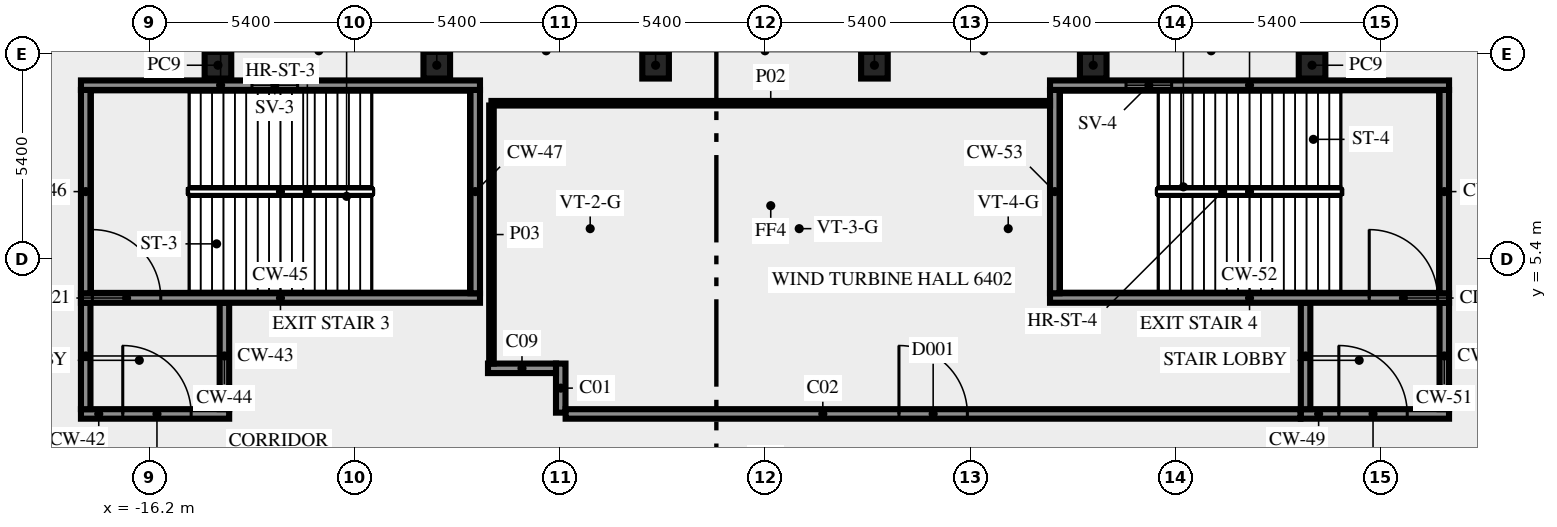
"""IFC4 building model, lengths in metres.
Left out: names, types, materials, properties, quantities, classifications, styles, units other than length and angle.
Written with IfcOpenShell. Run it as: python <this file> out.ifc"""

import sys

from ifc_helpers import new_model, si_unit, direction, frame, frame_2d, origin, origin_2d, place, context, subcontext, project, spatial, rectangle, extrude, element, fill, save


model = new_model("IFC4")
c1 = context("Model", 3, precision=1e-05, world=origin(), true_north=direction((0.0, 1.0)))
c2 = subcontext(c1, "Body", "Model", "MODEL_VIEW")
j1 = project(units=[si_unit("LENGTHUNIT", "METRE"), si_unit("PLANEANGLEUNIT", "RADIAN")], contexts=[c1])
p1 = place(None, origin())
s1 = spatial("IfcSite", under=j1, at=p1, CompositionType="ELEMENT")
p2 = place(p1, origin())
s2 = spatial("IfcBuilding", under=s1, at=p2, CompositionType="ELEMENT")
p3 = place(p2, frame((0.0, 0.0, 273.0)))
s3 = spatial("IfcBuildingStorey", under=s2, at=p3, CompositionType="ELEMENT", Elevation=273.0)
for number, where, z_axis, x_axis in (
    (1, (14.395, 10.5, 0.0), (0.0, 0.0, 1.0), (-1.0, 0.0, 0.0)),
    (2, (8.637, 10.5, 0.0), (0.0, 0.0, 1.0), (-1.0, 0.0, 0.0)),
    (3, (2.879, 10.5, 0.0), (0.0, 0.0, 1.0), (-1.0, 0.0, 0.0)),
    (4, (-2.879, 10.5, 0.0), (0.0, 0.0, 1.0), (-1.0, 0.0, 0.0)),
    (5, (-8.637, 10.5, 0.0), (0.0, 0.0, 1.0), (-1.0, 0.0, 0.0)),
    (6, (-14.395, 10.5, 0.0), (0.0, 0.0, 1.0), (-1.0, 0.0, 0.0)),
):
    element("IfcColumn", number, at=place(p3, frame(where, z_axis=z_axis, x_axis=x_axis)), inside=s3, PredefinedType="COLUMN", context=c2, shape_type="SweptSolid", body=[
        extrude(rectangle(XDim=0.7, YDim=0.7, at=origin_2d()), origin(), (0.0, 0.0, 1.0), 7.65),
    ])
p4 = place(p3, frame((-18.0, 1.325, 0.0), z_axis=(0.0, 0.0, 1.0), x_axis=(1.0, 0.0, 0.0)))
e7 = element("IfcWall", 7, at=p4, inside=s3, PredefinedType="SHEAR", context=c2, shape_type="SweptSolid", body=[
    extrude(rectangle(XDim=3.9, YDim=0.25, at=frame_2d((1.95, 0.0))), origin(), (0.0, 0.0, 1.0), 7.65),
])
p5 = place(p4, frame((1.1, 0.0, 0.0)))
e8 = element("IfcOpeningElement", 8, at=p5, cuts=e7, PredefinedType="OPENING", context=c2, shape_type="SweptSolid", body=[
    extrude(rectangle(XDim=1.8, YDim=2.1, at=frame_2d((0.9, 1.05))), frame((0.0, 0.135, 0.0), z_axis=(0.0, -1.0, 0.0), x_axis=(1.0, 0.0, 0.0)), (0.0, 0.0, 1.0), 0.27),
])
for number, where, z_axis, x_axis in (
    (9, (-17.875, 1.45, 0.0), (0.0, 0.0, 1.0), (0.0, 1.0, 0.0)),
    (10, (-14.225, 1.45, 0.0), (0.0, 0.0, 1.0), (0.0, 1.0, 0.0)),
):
    element("IfcWall", number, at=place(p3, frame(where, z_axis=z_axis, x_axis=x_axis)), inside=s3, PredefinedType="SHEAR", context=c2, shape_type="SweptSolid", body=[
        extrude(rectangle(XDim=2.8, YDim=0.25, at=frame_2d((1.4, 0.0))), origin(), (0.0, 0.0, 1.0), 7.65),
    ])
p6 = place(p3, frame((-18.0, 4.375, 0.0), z_axis=(0.0, 0.0, 1.0), x_axis=(1.0, 0.0, 0.0)))
e11 = element("IfcWall", 11, at=p6, inside=s3, PredefinedType="SHEAR", context=c2, shape_type="SweptSolid", body=[
    extrude(rectangle(XDim=10.5, YDim=0.25, at=frame_2d((5.25, 0.0))), origin(), (0.0, 0.0, 1.0), 7.65),
])
p7 = place(p6, frame((0.3, 0.0, 0.0)))
e12 = element("IfcOpeningElement", 12, at=p7, cuts=e11, PredefinedType="OPENING", context=c2, shape_type="SweptSolid", body=[
    extrude(rectangle(XDim=1.8, YDim=2.1, at=frame_2d((0.9, 1.05))), frame((0.0, 0.135, 0.0), z_axis=(0.0, -1.0, 0.0), x_axis=(1.0, 0.0, 0.0)), (0.0, 0.0, 1.0), 0.27),
])
for number, where, z_axis, x_axis in (
    (13, (-17.875, 4.5, 0.0), (0.0, 0.0, 1.0), (0.0, 1.0, 0.0)),
    (14, (-7.625, 4.5, 0.0), (0.0, 0.0, 1.0), (0.0, 1.0, 0.0)),
):
    element("IfcWall", number, at=place(p3, frame(where, z_axis=z_axis, x_axis=x_axis)), inside=s3, PredefinedType="SHEAR", context=c2, shape_type="SweptSolid", body=[
        extrude(rectangle(XDim=5.35, YDim=0.25, at=frame_2d((2.675, 0.0))), origin(), (0.0, 0.0, 1.0), 7.65),
    ])
p8 = place(p3, frame((-18.0, 9.975, 0.0), z_axis=(0.0, 0.0, 1.0), x_axis=(1.0, 0.0, 0.0)))
e15 = element("IfcWall", 15, at=p8, inside=s3, PredefinedType="SHEAR", context=c2, shape_type="SweptSolid", body=[
    extrude(rectangle(XDim=10.5, YDim=0.25, at=frame_2d((5.25, 0.0))), origin(), (0.0, 0.0, 1.0), 7.65),
])
p9 = place(p8, frame((4.5, 0.0, 1.0)))
e16 = element("IfcOpeningElement", 16, at=p9, cuts=e15, PredefinedType="OPENING", context=c2, shape_type="SweptSolid", body=[
    extrude(rectangle(XDim=1.2, YDim=1.2, at=frame_2d((0.6, 0.6))), frame((0.0, 0.135, 0.0), z_axis=(0.0, -1.0, 0.0), x_axis=(1.0, 0.0, 0.0)), (0.0, 0.0, 1.0), 0.27),
])
p10 = place(p3, frame((14.1, 1.325, 0.0), z_axis=(0.0, 0.0, 1.0), x_axis=(1.0, 0.0, 0.0)))
e17 = element("IfcWall", 17, at=p10, inside=s3, PredefinedType="SHEAR", context=c2, shape_type="SweptSolid", body=[
    extrude(rectangle(XDim=3.9, YDim=0.25, at=frame_2d((1.95, 0.0))), origin(), (0.0, 0.0, 1.0), 7.65),
])
p11 = place(p10, frame((1.0, 0.0, 0.0)))
e18 = element("IfcOpeningElement", 18, at=p11, cuts=e17, PredefinedType="OPENING", context=c2, shape_type="SweptSolid", body=[
    extrude(rectangle(XDim=1.8, YDim=2.1, at=frame_2d((0.9, 1.05))), frame((0.0, 0.135, 0.0), z_axis=(0.0, -1.0, 0.0), x_axis=(1.0, 0.0, 0.0)), (0.0, 0.0, 1.0), 0.27),
])
for number, where, z_axis, x_axis in (
    (19, (14.225, 1.45, 0.0), (0.0, 0.0, 1.0), (0.0, 1.0, 0.0)),
    (20, (17.875, 1.45, 0.0), (0.0, 0.0, 1.0), (0.0, 1.0, 0.0)),
):
    element("IfcWall", number, at=place(p3, frame(where, z_axis=z_axis, x_axis=x_axis)), inside=s3, PredefinedType="SHEAR", context=c2, shape_type="SweptSolid", body=[
        extrude(rectangle(XDim=2.8, YDim=0.25, at=frame_2d((1.4, 0.0))), origin(), (0.0, 0.0, 1.0), 7.65),
    ])
p12 = place(p3, frame((7.5, 4.375, 0.0), z_axis=(0.0, 0.0, 1.0), x_axis=(1.0, 0.0, 0.0)))
e21 = element("IfcWall", 21, at=p12, inside=s3, PredefinedType="SHEAR", context=c2, shape_type="SweptSolid", body=[
    extrude(rectangle(XDim=10.5, YDim=0.25, at=frame_2d((5.25, 0.0))), origin(), (0.0, 0.0, 1.0), 7.65),
])
p13 = place(p12, frame((8.4, 0.0, 0.0)))
e22 = element("IfcOpeningElement", 22, at=p13, cuts=e21, PredefinedType="OPENING", context=c2, shape_type="SweptSolid", body=[
    extrude(rectangle(XDim=1.8, YDim=2.1, at=frame_2d((0.9, 1.05))), frame((0.0, 0.135, 0.0), z_axis=(0.0, -1.0, 0.0), x_axis=(1.0, 0.0, 0.0)), (0.0, 0.0, 1.0), 0.27),
])
for number, where, z_axis, x_axis in (
    (23, (7.625, 4.5, 0.0), (0.0, 0.0, 1.0), (0.0, 1.0, 0.0)),
    (24, (17.875, 4.5, 0.0), (0.0, 0.0, 1.0), (0.0, 1.0, 0.0)),
):
    element("IfcWall", number, at=place(p3, frame(where, z_axis=z_axis, x_axis=x_axis)), inside=s3, PredefinedType="SHEAR", context=c2, shape_type="SweptSolid", body=[
        extrude(rectangle(XDim=5.35, YDim=0.25, at=frame_2d((2.675, 0.0))), origin(), (0.0, 0.0, 1.0), 7.65),
    ])
p14 = place(p3, frame((7.5, 9.975, 0.0), z_axis=(0.0, 0.0, 1.0), x_axis=(1.0, 0.0, 0.0)))
e25 = element("IfcWall", 25, at=p14, inside=s3, PredefinedType="SHEAR", context=c2, shape_type="SweptSolid", body=[
    extrude(rectangle(XDim=10.5, YDim=0.25, at=frame_2d((5.25, 0.0))), origin(), (0.0, 0.0, 1.0), 7.65),
])
p15 = place(p14, frame((2.0, 0.0, 1.0)))
e26 = element("IfcOpeningElement", 26, at=p15, cuts=e25, PredefinedType="OPENING", context=c2, shape_type="SweptSolid", body=[
    extrude(rectangle(XDim=1.2, YDim=1.2, at=frame_2d((0.6, 0.6))), frame((0.0, 0.135, 0.0), z_axis=(0.0, -1.0, 0.0), x_axis=(1.0, 0.0, 0.0)), (0.0, 0.0, 1.0), 0.27),
])
p16 = place(p3, frame((-5.375, 2.65, 0.0), z_axis=(0.0, 0.0, 1.0), x_axis=(0.0, -1.0, 0.0)))
e27 = element("IfcWall", 27, at=p16, inside=s3, PredefinedType="SOLIDWALL", context=c2, shape_type="SweptSolid", body=[
    extrude(rectangle(XDim=1.291, YDim=0.25, at=frame_2d((0.646, 0.0))), origin(), (0.0, 0.0, 1.0), 7.65),
])
p17 = place(p3, frame((-5.246, 1.325, 0.0), z_axis=(0.0, 0.0, 1.0), x_axis=(1.0, 0.0, 0.0)))
e28 = element("IfcWall", 28, at=p17, inside=s3, PredefinedType="SOLIDWALL", context=c2, shape_type="SweptSolid", body=[
    extrude(rectangle(XDim=19.336, YDim=0.25, at=frame_2d((9.668, 0.0))), origin(), (0.0, 0.0, 1.0), 7.65),
])
p18 = place(p17, frame((8.771, 0.0, 0.0)))
e29 = element("IfcOpeningElement", 29, at=p18, cuts=e28, PredefinedType="OPENING", context=c2, shape_type="SweptSolid", body=[
    extrude(rectangle(XDim=1.8, YDim=2.1, at=frame_2d((0.9, 1.05))), frame((0.0, 0.135, 0.0), z_axis=(0.0, -1.0, 0.0), x_axis=(1.0, 0.0, 0.0)), (0.0, 0.0, 1.0), 0.27),
])
p19 = place(p3, frame((-7.289, 2.525, 0.0), z_axis=(0.0, 0.0, 1.0), x_axis=(1.0, 0.0, 0.0)))
e30 = element("IfcWall", 30, at=p19, inside=s3, PredefinedType="SOLIDWALL", context=c2, shape_type="SweptSolid", body=[
    extrude(rectangle(XDim=1.789, YDim=0.25, at=frame_2d((0.895, 0.0))), origin(), (0.0, 0.0, 1.0), 7.65),
])
p20 = place(p3, frame((7.5, 9.5, 0.0), z_axis=(0.0, 0.0, 1.0), x_axis=(-1.0, 0.0, 0.0)))
e31 = element("IfcWall", 31, at=p20, inside=s3, PredefinedType="PARTITIONING", context=c2, shape_type="SweptSolid", body=[
    extrude(rectangle(XDim=14.698, YDim=0.12, at=frame_2d((7.349, 0.0))), origin(), (0.0, 0.0, 1.0), 7.65),
])
p21 = place(p3, frame((-7.198, 9.44, 0.0), z_axis=(0.0, 0.0, 1.0), x_axis=(0.0, -1.0, 0.0)))
e32 = element("IfcWall", 32, at=p21, inside=s3, PredefinedType="PARTITIONING", context=c2, shape_type="SweptSolid", body=[
    extrude(rectangle(XDim=6.79, YDim=0.12, at=frame_2d((3.395, 0.0))), origin(), (0.0, 0.0, 1.0), 7.65),
])
p22 = place(p5, origin())
e33 = element("IfcDoor", 33, at=p22, inside=s3, OperationType="DOUBLE_DOOR_SINGLE_SWING", PredefinedType="DOOR", context=c2, shape_type="SweptSolid", body=[
    extrude(rectangle(XDim=1.8, YDim=2.1, at=frame_2d((0.9, 1.05))), frame((0.0, 0.025, 0.0), z_axis=(0.0, -1.0, 0.0), x_axis=(1.0, 0.0, 0.0)), (0.0, 0.0, 1.0), 0.05),
])
fill(e8, e33)
p23 = place(p7, origin())
e34 = element("IfcDoor", 34, at=p23, inside=s3, OperationType="DOUBLE_DOOR_SINGLE_SWING", PredefinedType="DOOR", context=c2, shape_type="SweptSolid", body=[
    extrude(rectangle(XDim=1.8, YDim=2.1, at=frame_2d((0.9, 1.05))), frame((0.0, 0.025, 0.0), z_axis=(0.0, -1.0, 0.0), x_axis=(1.0, 0.0, 0.0)), (0.0, 0.0, 1.0), 0.05),
])
fill(e12, e34)
p24 = place(p9, origin())
e35 = element("IfcWindow", 35, at=p24, inside=s3, PartitioningType="SINGLE_PANEL", PredefinedType="WINDOW", context=c2, shape_type="SweptSolid", body=[
    extrude(rectangle(XDim=1.2, YDim=1.2, at=frame_2d((0.6, 0.6))), frame((0.0, 0.03, 0.0), z_axis=(0.0, -1.0, 0.0), x_axis=(1.0, 0.0, 0.0)), (0.0, 0.0, 1.0), 0.06),
])
fill(e16, e35)
p25 = place(p11, origin())
e36 = element("IfcDoor", 36, at=p25, inside=s3, OperationType="DOUBLE_DOOR_SINGLE_SWING", PredefinedType="DOOR", context=c2, shape_type="SweptSolid", body=[
    extrude(rectangle(XDim=1.8, YDim=2.1, at=frame_2d((0.9, 1.05))), frame((0.0, 0.025, 0.0), z_axis=(0.0, -1.0, 0.0), x_axis=(1.0, 0.0, 0.0)), (0.0, 0.0, 1.0), 0.05),
])
fill(e18, e36)
p26 = place(p13, origin())
e37 = element("IfcDoor", 37, at=p26, inside=s3, OperationType="DOUBLE_DOOR_SINGLE_SWING", PredefinedType="DOOR", context=c2, shape_type="SweptSolid", body=[
    extrude(rectangle(XDim=1.8, YDim=2.1, at=frame_2d((0.9, 1.05))), frame((0.0, 0.025, 0.0), z_axis=(0.0, -1.0, 0.0), x_axis=(1.0, 0.0, 0.0)), (0.0, 0.0, 1.0), 0.05),
])
fill(e22, e37)
p27 = place(p15, origin())
e38 = element("IfcWindow", 38, at=p27, inside=s3, PartitioningType="SINGLE_PANEL", PredefinedType="WINDOW", context=c2, shape_type="SweptSolid", body=[
    extrude(rectangle(XDim=1.2, YDim=1.2, at=frame_2d((0.6, 0.6))), frame((0.0, 0.03, 0.0), z_axis=(0.0, -1.0, 0.0), x_axis=(1.0, 0.0, 0.0)), (0.0, 0.0, 1.0), 0.06),
])
fill(e26, e38)
p28 = place(p18, origin())
e39 = element("IfcDoor", 39, at=p28, inside=s3, OperationType="DOUBLE_DOOR_SINGLE_SWING", PredefinedType="DOOR", context=c2, shape_type="SweptSolid", body=[
    extrude(rectangle(XDim=1.8, YDim=2.1, at=frame_2d((0.9, 1.05))), frame((0.0, 0.025, 0.0), z_axis=(0.0, -1.0, 0.0), x_axis=(1.0, 0.0, 0.0)), (0.0, 0.0, 1.0), 0.05),
])
fill(e29, e39)
save(model, sys.argv[1])
